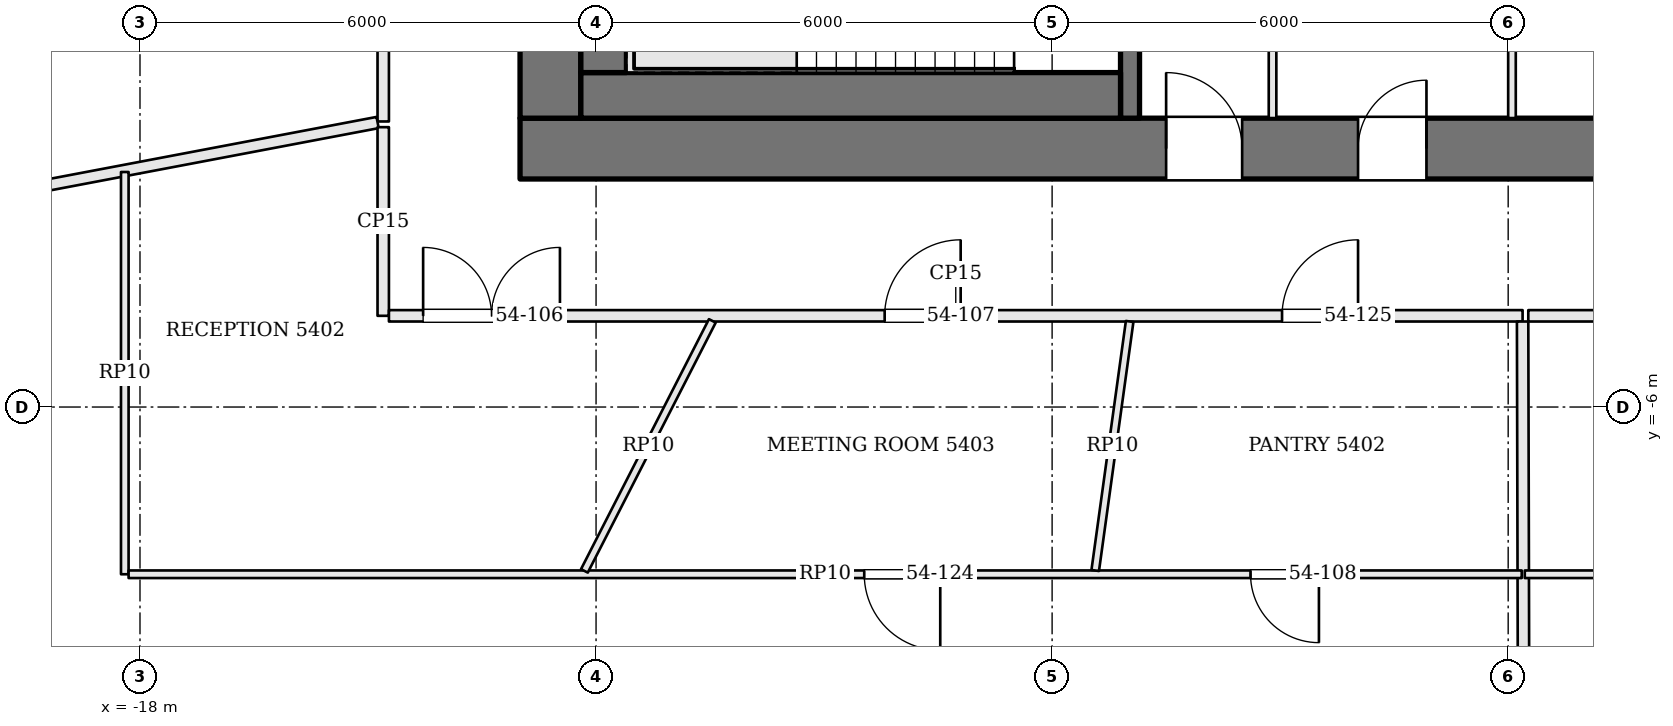
"""IFC4 building model, lengths in metres.
Left out: names, types, materials, properties, quantities, classifications, styles, units other than length and angle.
Written with IfcOpenShell. Run it as: python <this file> out.ifc"""

import sys

from ifc_helpers import new_model, si_unit, direction, frame, frame_2d, origin, place, context, subcontext, project, spatial, rectangle, extrude, element, fill, save


model = new_model("IFC4")
c1 = context("Model", 3, precision=1e-05, world=origin(), true_north=direction((0.0, 1.0)))
c2 = subcontext(c1, "Body", "Model", "MODEL_VIEW")
j1 = project(units=[si_unit("LENGTHUNIT", "METRE"), si_unit("PLANEANGLEUNIT", "RADIAN")], contexts=[c1])
p1 = place(None, origin())
s1 = spatial("IfcSite", under=j1, at=p1, CompositionType="ELEMENT")
p2 = place(p1, origin())
s2 = spatial("IfcBuilding", under=s1, at=p2, CompositionType="ELEMENT")
p3 = place(p2, frame((0.0, 0.0, 221.4)))
s3 = spatial("IfcBuildingStorey", under=s2, at=p3, CompositionType="ELEMENT", Elevation=221.4)
p4 = place(p3, frame((-13.0, -2.6, 0.0), z_axis=(0.0, 0.0, 1.0), x_axis=(1.0, 0.0, 0.0)))
e1 = element("IfcWall", 1, at=p4, inside=s3, PredefinedType="SHEAR", context=c2, shape_type="SweptSolid", body=[
    extrude(rectangle(XDim=26.0, YDim=0.8, at=frame_2d((13.0, 0.0))), origin(), (0.0, 0.0, 1.0), 3.9),
])
p5 = place(p4, frame((8.5, 0.0, 0.0)))
e2 = element("IfcOpeningElement", 2, at=p5, cuts=e1, PredefinedType="OPENING", context=c2, shape_type="SweptSolid", body=[
    extrude(rectangle(XDim=1.0, YDim=2.1, at=frame_2d((0.5, 1.05))), frame((0.0, 0.41, 0.0), z_axis=(0.0, -1.0, 0.0), x_axis=(1.0, 0.0, 0.0)), (0.0, 0.0, 1.0), 0.82),
])
p6 = place(p4, frame((11.025, 0.0, 0.0)))
e3 = element("IfcOpeningElement", 3, at=p6, cuts=e1, PredefinedType="OPENING", context=c2, shape_type="SweptSolid", body=[
    extrude(rectangle(XDim=0.9, YDim=2.1, at=frame_2d((0.45, 1.05))), frame((0.0, 0.41, 0.0), z_axis=(0.0, -1.0, 0.0), x_axis=(1.0, 0.0, 0.0)), (0.0, 0.0, 1.0), 0.82),
])
p7 = place(p4, frame((14.225, 0.0, 0.0)))
e4 = element("IfcOpeningElement", 4, at=p7, cuts=e1, PredefinedType="OPENING", context=c2, shape_type="SweptSolid", body=[
    extrude(rectangle(XDim=0.9, YDim=2.1, at=frame_2d((0.45, 1.05))), frame((0.0, 0.41, 0.0), z_axis=(0.0, -1.0, 0.0), x_axis=(1.0, 0.0, 0.0)), (0.0, 0.0, 1.0), 0.82),
])
p8 = place(p4, frame((16.6, 0.0, 0.0)))
e5 = element("IfcOpeningElement", 5, at=p8, cuts=e1, PredefinedType="OPENING", context=c2, shape_type="SweptSolid", body=[
    extrude(rectangle(XDim=1.0, YDim=2.1, at=frame_2d((0.5, 1.05))), frame((0.0, 0.41, 0.0), z_axis=(0.0, -1.0, 0.0), x_axis=(1.0, 0.0, 0.0)), (0.0, 0.0, 1.0), 0.82),
])
p9 = place(p3, frame((-12.6, -2.2, 0.0), z_axis=(0.0, 0.0, 1.0), x_axis=(0.0, 1.0, 0.0)))
e6 = element("IfcWall", 6, at=p9, inside=s3, PredefinedType="SHEAR", context=c2, shape_type="SweptSolid", body=[
    extrude(rectangle(XDim=13.4, YDim=0.8, at=frame_2d((6.7, 0.0))), origin(), (0.0, 0.0, 1.0), 3.9),
])
p10 = place(p9, frame((4.2, 0.0, 0.0)))
e7 = element("IfcOpeningElement", 7, at=p10, cuts=e6, PredefinedType="OPENING", context=c2, shape_type="SweptSolid", body=[
    extrude(rectangle(XDim=1.8, YDim=2.1, at=frame_2d((0.9, 1.05))), frame((0.0, 0.41, 0.0), z_axis=(0.0, -1.0, 0.0), x_axis=(1.0, 0.0, 0.0)), (0.0, 0.0, 1.0), 0.82),
])
p11 = place(p3, frame((-4.975, -2.2, 0.0), z_axis=(0.0, 0.0, 1.0), x_axis=(0.0, 1.0, 0.0)))
e8 = element("IfcWall", 8, at=p11, inside=s3, PredefinedType="SOLIDWALL", context=c2, shape_type="SweptSolid", body=[
    extrude(rectangle(XDim=13.4, YDim=0.25, at=frame_2d((6.7, 0.0))), origin(), (0.0, 0.0, 1.0), 3.7),
])
p12 = place(p11, frame((5.25, 0.0, 0.0)))
e9 = element("IfcOpeningElement", 9, at=p12, cuts=e8, PredefinedType="OPENING", context=c2, shape_type="SweptSolid", body=[
    extrude(rectangle(XDim=1.2, YDim=2.1, at=frame_2d((0.6, 1.05))), frame((0.0, 0.135, 0.0), z_axis=(0.0, -1.0, 0.0), x_axis=(1.0, 0.0, 0.0)), (0.0, 0.0, 1.0), 0.27),
])
p13 = place(p3, frame((-12.2, -1.9, 0.0), z_axis=(0.0, 0.0, 1.0), x_axis=(1.0, 0.0, 0.0)))
e10 = element("IfcWall", 10, at=p13, inside=s3, PredefinedType="SOLIDWALL", context=c2, shape_type="SweptSolid", body=[
    extrude(rectangle(XDim=7.1, YDim=0.6, at=frame_2d((3.55, 0.0))), origin(), (0.0, 0.0, 1.0), 3.7),
])
p14 = place(p3, frame((-11.9, -1.6, 0.0), z_axis=(0.0, 0.0, 1.0), x_axis=(0.0, 1.0, 0.0)))
e11 = element("IfcWall", 11, at=p14, inside=s3, PredefinedType="SOLIDWALL", context=c2, shape_type="SweptSolid", body=[
    extrude(rectangle(XDim=2.95, YDim=0.6, at=frame_2d((1.475, 0.0))), origin(), (0.0, 0.0, 1.0), 3.7),
])
for number, where, z_axis, x_axis in (
    (12, (-3.1, -2.2, 0.0), (0.0, 0.0, 1.0), (0.0, 1.0, 0.0)),
    (13, (0.05, -2.2, 0.0), (0.0, 0.0, 1.0), (0.0, 1.0, 0.0)),
):
    element("IfcWall", number, at=place(p3, frame(where, z_axis=z_axis, x_axis=x_axis)), inside=s3, PredefinedType="PARTITIONING", context=c2, shape_type="SweptSolid", body=[
        extrude(rectangle(XDim=2.6, YDim=0.1, at=frame_2d((1.3, 0.0))), origin(), (0.0, 0.0, 1.0), 3.7),
    ])
p15 = place(p3, frame((-14.8, 13.725, 0.0), z_axis=(0.0, 0.0, 1.0), x_axis=(0.0, -1.0, 0.0)))
e14 = element("IfcWall", 14, at=p15, inside=s3, PredefinedType="PARTITIONING", context=c2, shape_type="SweptSolid", body=[
    extrude(rectangle(XDim=15.968, YDim=0.15, at=frame_2d((7.984, 0.0))), origin(), (0.0, 0.0, 1.0), 3.084),
])
p16 = place(p15, frame((2.596, 0.0, 0.0)))
e15 = element("IfcOpeningElement", 15, at=p16, cuts=e14, PredefinedType="OPENING", context=c2, shape_type="SweptSolid", body=[
    extrude(rectangle(XDim=1.0, YDim=2.4, at=frame_2d((0.5, 1.2))), frame((0.0, 0.085, 0.0), z_axis=(0.0, -1.0, 0.0), x_axis=(1.0, 0.0, 0.0)), (0.0, 0.0, 1.0), 0.17),
])
p17 = place(p15, frame((8.25, 0.0, 0.0)))
e16 = element("IfcOpeningElement", 16, at=p17, cuts=e14, PredefinedType="OPENING", context=c2, shape_type="SweptSolid", body=[
    extrude(rectangle(XDim=1.0, YDim=2.1, at=frame_2d((0.5, 1.05))), frame((0.0, 0.085, 0.0), z_axis=(0.0, -1.0, 0.0), x_axis=(1.0, 0.0, 0.0)), (0.0, 0.0, 1.0), 0.17),
])
p18 = place(p15, frame((13.15, 0.0, 0.0)))
e17 = element("IfcOpeningElement", 17, at=p18, cuts=e14, PredefinedType="OPENING", context=c2, shape_type="SweptSolid", body=[
    extrude(rectangle(XDim=1.0, YDim=2.1, at=frame_2d((0.5, 1.05))), frame((0.0, 0.085, 0.0), z_axis=(0.0, -1.0, 0.0), x_axis=(1.0, 0.0, 0.0)), (0.0, 0.0, 1.0), 0.17),
])
p19 = place(p3, frame((-27.332, -4.618, 0.0), z_axis=(0.0, 0.0, 1.0), x_axis=(0.982506027703, 0.186230785661, 0.0)))
e18 = element("IfcWall", 18, at=p19, inside=s3, PredefinedType="PARTITIONING", context=c2, shape_type="SweptSolid", body=[
    extrude(rectangle(XDim=12.68, YDim=0.15, at=frame_2d((6.34, 0.0))), origin(), (0.0, 0.0, 1.0), 3.234),
])
p20 = place(p3, frame((-14.8, -2.318, 0.0), z_axis=(0.0, 0.0, 1.0), x_axis=(0.0, -1.0, 0.0)))
e19 = element("IfcWall", 19, at=p20, inside=s3, PredefinedType="PARTITIONING", context=c2, shape_type="SweptSolid", body=[
    extrude(rectangle(XDim=2.482, YDim=0.15, at=frame_2d((1.241, 0.0))), origin(), (0.0, 0.0, 1.0), 3.084),
])
p21 = place(p3, frame((-14.725, -4.8, 0.0), z_axis=(0.0, 0.0, 1.0), x_axis=(1.0, 0.0, 0.0)))
e20 = element("IfcWall", 20, at=p21, inside=s3, PredefinedType="PARTITIONING", context=c2, shape_type="SweptSolid", body=[
    extrude(rectangle(XDim=14.915, YDim=0.15, at=frame_2d((7.458, 0.0))), origin(), (0.0, 0.0, 1.0), 3.084),
])
p22 = place(p21, frame((0.45, 0.0, 0.0)))
e21 = element("IfcOpeningElement", 21, at=p22, cuts=e20, PredefinedType="OPENING", context=c2, shape_type="SweptSolid", body=[
    extrude(rectangle(XDim=1.8, YDim=2.1, at=frame_2d((0.9, 1.05))), frame((0.0, 0.085, 0.0), z_axis=(0.0, -1.0, 0.0), x_axis=(1.0, 0.0, 0.0)), (0.0, 0.0, 1.0), 0.17),
])
p23 = place(p21, frame((6.522, 0.0, 0.0)))
e22 = element("IfcOpeningElement", 22, at=p23, cuts=e20, PredefinedType="OPENING", context=c2, shape_type="SweptSolid", body=[
    extrude(rectangle(XDim=1.0, YDim=2.4, at=frame_2d((0.5, 1.2))), frame((0.0, 0.085, 0.0), z_axis=(0.0, -1.0, 0.0), x_axis=(1.0, 0.0, 0.0)), (0.0, 0.0, 1.0), 0.17),
])
p24 = place(p21, frame((11.75, 0.0, 0.0)))
e23 = element("IfcOpeningElement", 23, at=p24, cuts=e20, PredefinedType="OPENING", context=c2, shape_type="SweptSolid", body=[
    extrude(rectangle(XDim=1.0, YDim=2.1, at=frame_2d((0.5, 1.05))), frame((0.0, 0.085, 0.0), z_axis=(0.0, -1.0, 0.0), x_axis=(1.0, 0.0, 0.0)), (0.0, 0.0, 1.0), 0.17),
])
p25 = place(p3, frame((0.226, -19.158, 0.0), z_axis=(0.0, 0.0, 1.0), x_axis=(-0.002529819945, 0.9999968, 0.0)))
e24 = element("IfcWall", 24, at=p25, inside=s3, PredefinedType="PARTITIONING", context=c2, shape_type="SweptSolid", body=[
    extrude(rectangle(XDim=14.283, YDim=0.15, at=frame_2d((7.141, 0.0))), origin(), (0.0, 0.0, 1.0), 3.234),
])
p26 = place(p3, frame((0.265, -4.8, 0.0), z_axis=(0.0, 0.0, 1.0), x_axis=(1.0, 0.0, 0.0)))
e25 = element("IfcWall", 25, at=p26, inside=s3, PredefinedType="PARTITIONING", context=c2, shape_type="SweptSolid", body=[
    extrude(rectangle(XDim=14.535, YDim=0.15, at=frame_2d((7.268, 0.0))), origin(), (0.0, 0.0, 1.0), 3.084),
])
p27 = place(p26, frame((1.425, 0.0, 0.0)))
e26 = element("IfcOpeningElement", 26, at=p27, cuts=e25, PredefinedType="OPENING", context=c2, shape_type="SweptSolid", body=[
    extrude(rectangle(XDim=1.8, YDim=2.1, at=frame_2d((0.9, 1.05))), frame((0.0, 0.085, 0.0), z_axis=(0.0, -1.0, 0.0), x_axis=(1.0, 0.0, 0.0)), (0.0, 0.0, 1.0), 0.17),
])
p28 = place(p26, frame((6.872, 0.0, 0.0)))
e27 = element("IfcOpeningElement", 27, at=p28, cuts=e25, PredefinedType="OPENING", context=c2, shape_type="SweptSolid", body=[
    extrude(rectangle(XDim=1.0, YDim=2.4, at=frame_2d((0.5, 1.2))), frame((0.0, 0.085, 0.0), z_axis=(0.0, -1.0, 0.0), x_axis=(1.0, 0.0, 0.0)), (0.0, 0.0, 1.0), 0.17),
])
p29 = place(p26, frame((11.538, 0.0, 0.0)))
e28 = element("IfcOpeningElement", 28, at=p29, cuts=e25, PredefinedType="OPENING", context=c2, shape_type="SweptSolid", body=[
    extrude(rectangle(XDim=1.0, YDim=2.4, at=frame_2d((0.5, 1.2))), frame((0.0, 0.085, 0.0), z_axis=(0.0, -1.0, 0.0), x_axis=(1.0, 0.0, 0.0)), (0.0, 0.0, 1.0), 0.17),
])
p30 = place(p3, frame((-18.2, -8.2, 0.0), z_axis=(0.0, 0.0, 1.0), x_axis=(0.0, 1.0, 0.0)))
e29 = element("IfcWall", 29, at=p30, inside=s3, PredefinedType="PARTITIONING", context=c2, shape_type="SweptSolid", body=[
    extrude(rectangle(XDim=5.292, YDim=0.1, at=frame_2d((2.646, 0.0))), origin(), (0.0, 0.0, 1.0), 3.084),
])
p31 = place(p3, frame((0.178, -8.2, 0.0), z_axis=(0.0, 0.0, 1.0), x_axis=(-1.0, 0.0, 0.0)))
e30 = element("IfcWall", 30, at=p31, inside=s3, PredefinedType="PARTITIONING", context=c2, shape_type="SweptSolid", body=[
    extrude(rectangle(XDim=18.328, YDim=0.1, at=frame_2d((9.164, 0.0))), origin(), (0.0, 0.0, 1.0), 3.084),
])
p32 = place(p31, frame((2.668, 0.0, 0.0)))
e31 = element("IfcOpeningElement", 31, at=p32, cuts=e30, PredefinedType="OPENING", context=c2, shape_type="SweptSolid", body=[
    extrude(rectangle(XDim=0.9, YDim=2.1, at=frame_2d((0.45, 1.05))), frame((0.0, 0.06, 0.0), z_axis=(0.0, -1.0, 0.0), x_axis=(1.0, 0.0, 0.0)), (0.0, 0.0, 1.0), 0.12),
])
p33 = place(p31, frame((7.65, 0.0, 0.0)))
e32 = element("IfcOpeningElement", 32, at=p33, cuts=e30, PredefinedType="OPENING", context=c2, shape_type="SweptSolid", body=[
    extrude(rectangle(XDim=1.0, YDim=2.4, at=frame_2d((0.5, 1.2))), frame((0.0, 0.06, 0.0), z_axis=(0.0, -1.0, 0.0), x_axis=(1.0, 0.0, 0.0)), (0.0, 0.0, 1.0), 0.12),
])
p34 = place(p3, frame((-10.47, -4.867, 0.0), z_axis=(0.0, 0.0, 1.0), x_axis=(-0.455520870398, -0.890225104472, 0.0)))
e33 = element("IfcWall", 33, at=p34, inside=s3, PredefinedType="PARTITIONING", context=c2, shape_type="SweptSolid", body=[
    extrude(rectangle(XDim=3.694, YDim=0.1, at=frame_2d((1.847, 0.0))), origin(), (0.0, 0.0, 1.0), 3.084),
])
p35 = place(p3, frame((-4.98, -4.874, 0.0), z_axis=(0.0, 0.0, 1.0), x_axis=(-0.136934649002, -0.990580083538, 0.0)))
e34 = element("IfcWall", 34, at=p35, inside=s3, PredefinedType="PARTITIONING", context=c2, shape_type="SweptSolid", body=[
    extrude(rectangle(XDim=3.307, YDim=0.1, at=frame_2d((1.654, 0.0))), origin(), (0.0, 0.0, 1.0), 3.084),
])
p36 = place(p3, frame((18.15, -8.2, 0.0), z_axis=(0.0, 0.0, 1.0), x_axis=(-1.0, 0.0, 0.0)))
e35 = element("IfcWall", 35, at=p36, inside=s3, PredefinedType="PARTITIONING", context=c2, shape_type="SweptSolid", body=[
    extrude(rectangle(XDim=17.932, YDim=0.1, at=frame_2d((8.966, 0.0))), origin(), (0.0, 0.0, 1.0), 3.084),
])
p37 = place(p36, frame((14.525, 0.0, 0.0)))
e36 = element("IfcOpeningElement", 36, at=p37, cuts=e35, PredefinedType="OPENING", context=c2, shape_type="SweptSolid", body=[
    extrude(rectangle(XDim=1.0, YDim=2.1, at=frame_2d((0.5, 1.05))), frame((0.0, 0.06, 0.0), z_axis=(0.0, -1.0, 0.0), x_axis=(1.0, 0.0, 0.0)), (0.0, 0.0, 1.0), 0.12),
])
p38 = place(p5, origin())
e37 = element("IfcDoor", 37, at=p38, inside=s3, OperationType="SINGLE_SWING_LEFT", PredefinedType="DOOR", context=c2, shape_type="SweptSolid", body=[
    extrude(rectangle(XDim=1.0, YDim=2.1, at=frame_2d((0.5, 1.05))), frame((0.0, 0.025, 0.0), z_axis=(0.0, -1.0, 0.0), x_axis=(1.0, 0.0, 0.0)), (0.0, 0.0, 1.0), 0.05),
])
fill(e2, e37)
p39 = place(p6, origin())
e38 = element("IfcDoor", 38, at=p39, inside=s3, OperationType="SINGLE_SWING_RIGHT", PredefinedType="DOOR", context=c2, shape_type="SweptSolid", body=[
    extrude(rectangle(XDim=0.9, YDim=2.1, at=frame_2d((0.45, 1.05))), frame((0.0, 0.025, 0.0), z_axis=(0.0, -1.0, 0.0), x_axis=(1.0, 0.0, 0.0)), (0.0, 0.0, 1.0), 0.05),
])
fill(e3, e38)
p40 = place(p22, origin())
e39 = element("IfcDoor", 39, at=p40, inside=s3, OperationType="DOUBLE_DOOR_SINGLE_SWING", PredefinedType="DOOR", context=c2, shape_type="SweptSolid", body=[
    extrude(rectangle(XDim=1.8, YDim=2.1, at=frame_2d((0.9, 1.05))), frame((0.0, 0.025, 0.0), z_axis=(0.0, -1.0, 0.0), x_axis=(1.0, 0.0, 0.0)), (0.0, 0.0, 1.0), 0.05),
])
fill(e21, e39)
p41 = place(p23, origin())
e40 = element("IfcDoor", 40, at=p41, inside=s3, OperationType="SINGLE_SWING_RIGHT", PredefinedType="DOOR", context=c2, shape_type="SweptSolid", body=[
    extrude(rectangle(XDim=1.0, YDim=2.4, at=frame_2d((0.5, 1.2))), frame((0.0, 0.025, 0.0), z_axis=(0.0, -1.0, 0.0), x_axis=(1.0, 0.0, 0.0)), (0.0, 0.0, 1.0), 0.05),
])
fill(e22, e40)
p42 = place(p32, origin())
e41 = element("IfcDoor", 41, at=p42, inside=s3, OperationType="SINGLE_SWING_LEFT", PredefinedType="DOOR", context=c2, shape_type="SweptSolid", body=[
    extrude(rectangle(XDim=0.9, YDim=2.1, at=frame_2d((0.45, 1.05))), frame((0.0, 0.025, 0.0), z_axis=(0.0, -1.0, 0.0), x_axis=(1.0, 0.0, 0.0)), (0.0, 0.0, 1.0), 0.05),
])
fill(e31, e41)
p43 = place(p33, origin())
e42 = element("IfcDoor", 42, at=p43, inside=s3, OperationType="SINGLE_SWING_LEFT", PredefinedType="DOOR", context=c2, shape_type="SweptSolid", body=[
    extrude(rectangle(XDim=1.0, YDim=2.4, at=frame_2d((0.5, 1.2))), frame((0.0, 0.025, 0.0), z_axis=(0.0, -1.0, 0.0), x_axis=(1.0, 0.0, 0.0)), (0.0, 0.0, 1.0), 0.05),
])
fill(e32, e42)
p44 = place(p24, origin())
e43 = element("IfcDoor", 43, at=p44, inside=s3, OperationType="SINGLE_SWING_RIGHT", PredefinedType="DOOR", context=c2, shape_type="SweptSolid", body=[
    extrude(rectangle(XDim=1.0, YDim=2.1, at=frame_2d((0.5, 1.05))), frame((0.0, 0.025, 0.0), z_axis=(0.0, -1.0, 0.0), x_axis=(1.0, 0.0, 0.0)), (0.0, 0.0, 1.0), 0.05),
])
fill(e23, e43)
save(model, sys.argv[1])
